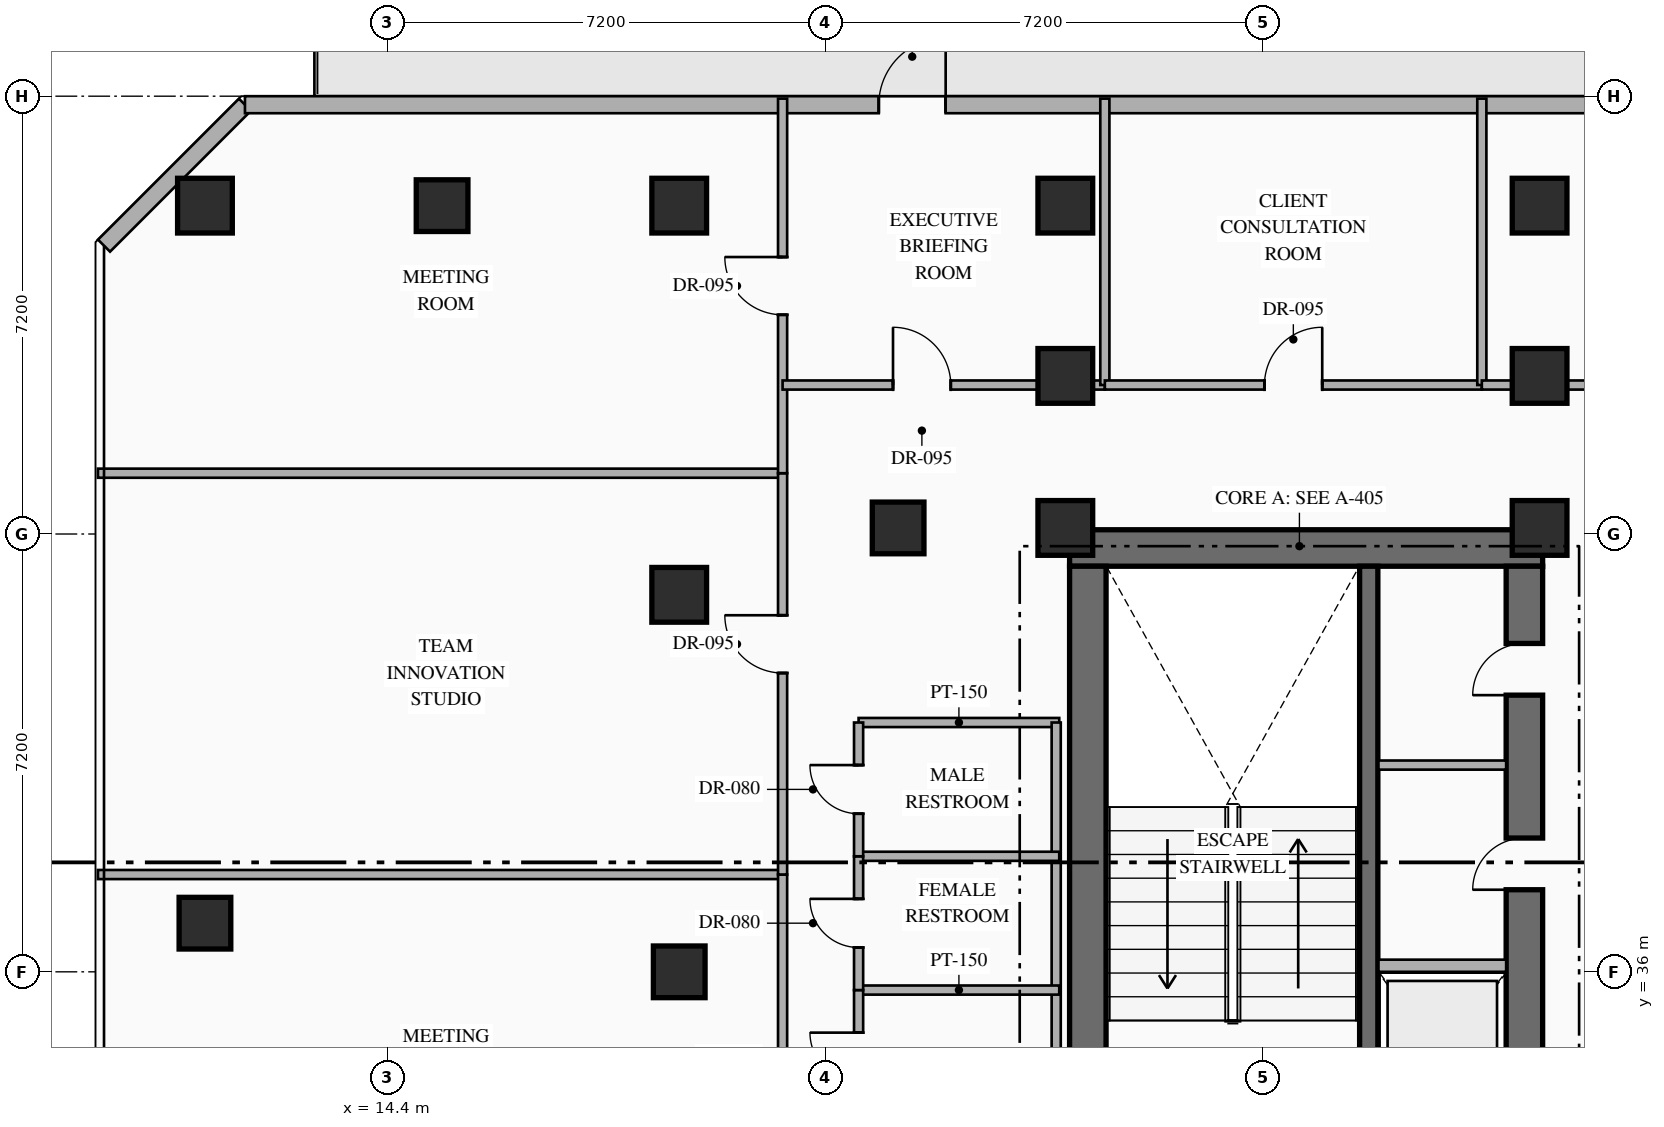
"""IFC4 building model, lengths in metres.
Left out: names, types, materials, properties, quantities, classifications, styles, units other than length and angle.
Written with IfcOpenShell. Run it as: python <this file> out.ifc"""

import sys

from ifc_helpers import new_model, si_unit, direction, frame, frame_2d, origin, origin_2d, place, context, subcontext, project, spatial, rectangle, hollow_rectangle, extrude, element, fill, save


model = new_model("IFC4")
c1 = context("Model", 3, precision=1e-05, world=origin(), true_north=direction((0.0, 1.0)))
c2 = subcontext(c1, "Body", "Model", "MODEL_VIEW")
j1 = project(units=[si_unit("LENGTHUNIT", "METRE"), si_unit("PLANEANGLEUNIT", "RADIAN")], contexts=[c1])
p1 = place(None, origin())
s1 = spatial("IfcSite", under=j1, at=p1, CompositionType="ELEMENT")
p2 = place(p1, origin())
s2 = spatial("IfcBuilding", under=s1, at=p2, CompositionType="ELEMENT")
p3 = place(p2, frame((0.0, 0.0, 112.05)))
s3 = spatial("IfcBuildingStorey", under=s2, at=p3, CompositionType="ELEMENT", Elevation=112.05)
p4 = place(p3, frame((25.62, 42.97, 0.0), z_axis=(0.0, 0.0, 1.0), x_axis=(1.0, 0.0, 0.0)))
e1 = element("IfcWall", 1, at=p4, inside=s3, PredefinedType="SHEAR", context=c2, shape_type="SweptSolid", body=[
    extrude(rectangle(XDim=7.78, YDim=0.6, at=frame_2d((3.89, 0.0))), origin(), (0.0, 0.0, 1.0), 3.6),
])
p5 = place(p3, frame((25.92, 33.19, 0.0), z_axis=(0.0, 0.0, 1.0), x_axis=(0.0, 1.0, 0.0)))
e2 = element("IfcWall", 2, at=p5, inside=s3, PredefinedType="SHEAR", context=c2, shape_type="SweptSolid", body=[
    extrude(rectangle(XDim=9.48, YDim=0.6, at=frame_2d((4.74, 0.0))), origin(), (0.0, 0.0, 1.0), 3.6),
])
p6 = place(p3, frame((33.1, 33.19, 0.0), z_axis=(0.0, 0.0, 1.0), x_axis=(0.0, 1.0, 0.0)))
e3 = element("IfcWall", 3, at=p6, inside=s3, PredefinedType="SHEAR", context=c2, shape_type="SweptSolid", body=[
    extrude(rectangle(XDim=9.48, YDim=0.6, at=frame_2d((4.74, 0.0))), origin(), (0.0, 0.0, 1.0), 3.6),
])
p7 = place(p6, frame((4.16, 0.0, 0.0)))
e4 = element("IfcOpeningElement", 4, at=p7, cuts=e3, PredefinedType="OPENING", context=c2, shape_type="SweptSolid", body=[
    extrude(rectangle(XDim=0.85, YDim=2.08, at=frame_2d((0.425, 1.04))), frame((0.0, 0.31, 0.0), z_axis=(0.0, -1.0, 0.0), x_axis=(1.0, 0.0, 0.0)), (0.0, 0.0, 1.0), 0.62),
])
p8 = place(p6, frame((7.36, 0.0, 0.0)))
e5 = element("IfcOpeningElement", 5, at=p8, cuts=e3, PredefinedType="OPENING", context=c2, shape_type="SweptSolid", body=[
    extrude(rectangle(XDim=0.85, YDim=2.08, at=frame_2d((0.425, 1.04))), frame((0.0, 0.31, 0.0), z_axis=(0.0, -1.0, 0.0), x_axis=(1.0, 0.0, 0.0)), (0.0, 0.0, 1.0), 0.62),
])
p9 = place(p3, frame((30.54, 33.19, 0.0), z_axis=(0.0, 0.0, 1.0), x_axis=(0.0, 1.0, 0.0)))
e6 = element("IfcWall", 6, at=p9, inside=s3, PredefinedType="SHEAR", context=c2, shape_type="SweptSolid", body=[
    extrude(rectangle(XDim=9.48, YDim=0.3, at=frame_2d((4.74, 0.0))), origin(), (0.0, 0.0, 1.0), 3.6),
])
for number, where, z_axis, x_axis in (
    (7, (25.55, 43.3, 0.0), (0.0, 0.0, 1.0), (1.0, 0.0, 0.0)),
    (8, (33.35, 43.3, 0.0), (0.0, 0.0, 1.0), (1.0, 0.0, 0.0)),
):
    element("IfcColumn", number, at=place(p3, frame(where, z_axis=z_axis, x_axis=x_axis)), inside=s3, PredefinedType="COLUMN", context=c2, shape_type="SweptSolid", body=[
        extrude(rectangle(XDim=0.9, YDim=0.9, at=origin_2d()), origin(), (0.0, 0.0, 1.0), 3.6),
    ])
for number, where, z_axis, x_axis in (
    (9, (25.55, 45.8, 0.0), (0.0, 0.0, 1.0), (1.0, 0.0, 0.0)),
    (10, (33.35, 45.8, 0.0), (0.0, 0.0, 1.0), (1.0, 0.0, 0.0)),
    (11, (11.4, 48.6, 0.0), (0.0, 0.0, 1.0), (1.0, 0.0, 0.0)),
    (12, (19.2, 48.6, 0.0), (0.0, 0.0, 1.0), (1.0, 0.0, 0.0)),
    (13, (25.55, 48.6, 0.0), (0.0, 0.0, 1.0), (1.0, 0.0, 0.0)),
    (14, (33.35, 48.6, 0.0), (0.0, 0.0, 1.0), (1.0, 0.0, 0.0)),
    (15, (19.2, 42.2, 0.0), (0.0, 0.0, 1.0), (1.0, 0.0, 0.0)),
):
    element("IfcColumn", number, at=place(p3, frame(where, z_axis=z_axis, x_axis=x_axis)), inside=s3, PredefinedType="COLUMN", context=c2, shape_type="SweptSolid", body=[
        extrude(hollow_rectangle(XDim=0.9, YDim=0.9, WallThickness=0.036, at=origin_2d()), origin(), (0.0, 0.0, 1.0), 3.6),
    ])
for number, where, z_axis, x_axis in (
    (16, (22.8, 43.3, 0.0), (0.0, 0.0, 1.0), (1.0, 0.0, 0.0)),
    (17, (11.4, 36.8, 0.0), (0.0, 0.0, 1.0), (1.0, 0.0, 0.0)),
    (18, (19.2, 36.0, 0.0), (0.0, 0.0, 1.0), (1.0, 0.0, 0.0)),
    (19, (15.3, 48.6, 0.0), (0.0, 0.0, 1.0), (1.0, 0.0, 0.0)),
):
    element("IfcColumn", number, at=place(p3, frame(where, z_axis=z_axis, x_axis=x_axis)), inside=s3, PredefinedType="COLUMN", context=c2, shape_type="SweptSolid", body=[
        extrude(hollow_rectangle(XDim=0.85, YDim=0.85, WallThickness=0.032, at=origin_2d()), origin(), (0.0, 0.0, 1.0), 3.6),
    ])
p10 = place(p3, frame((9.74, 47.942, 0.0), z_axis=(0.0, 0.0, 1.0), x_axis=(0.707106781187, 0.707106781187, 0.0)))
e20 = element("IfcWall", 20, at=p10, inside=s3, PredefinedType="STANDARD", context=c2, shape_type="SweptSolid", body=[
    extrude(rectangle(XDim=3.278, YDim=0.28, at=frame_2d((1.639, 0.0))), origin(), (0.0, 0.0, 1.0), 3.35),
])
p11 = place(p3, frame((12.058, 50.26, 0.0), z_axis=(0.0, 0.0, 1.0), x_axis=(1.0, 0.0, 0.0)))
e21 = element("IfcWall", 21, at=p11, inside=s3, PredefinedType="STANDARD", context=c2, shape_type="SweptSolid", body=[
    extrude(rectangle(XDim=30.484, YDim=0.28, at=frame_2d((15.242, 0.0))), origin(), (0.0, 0.0, 1.0), 3.35),
])
p12 = place(p11, frame((10.424, 0.0, 0.0)))
e22 = element("IfcOpeningElement", 22, at=p12, cuts=e21, PredefinedType="OPENING", context=c2, shape_type="SweptSolid", body=[
    extrude(rectangle(XDim=1.1, YDim=2.2, at=frame_2d((0.55, 1.1))), frame((0.0, 0.15, 0.0), z_axis=(0.0, -1.0, 0.0), x_axis=(1.0, 0.0, 0.0)), (0.0, 0.0, 1.0), 0.3),
])
p13 = place(p3, frame((30.7, 36.1, 0.0), z_axis=(0.0, 0.0, 1.0), x_axis=(1.0, 0.0, 0.0)))
e23 = element("IfcWall", 23, at=p13, inside=s3, PredefinedType="STANDARD", context=c2, shape_type="SweptSolid", body=[
    extrude(rectangle(XDim=2.1, YDim=0.2, at=frame_2d((1.05, 0.0))), origin(), (0.0, 0.0, 1.0), 3.35),
])
p14 = place(p3, frame((30.7, 39.4, 0.0), z_axis=(0.0, 0.0, 1.0), x_axis=(1.0, 0.0, 0.0)))
e24 = element("IfcWall", 24, at=p14, inside=s3, PredefinedType="PARTITIONING", context=c2, shape_type="SweptSolid", body=[
    extrude(rectangle(XDim=2.1, YDim=0.15, at=frame_2d((1.05, 0.0))), origin(), (0.0, 0.0, 1.0), 3.35),
])
p15 = place(p3, frame((22.15, 40.1, 0.0), z_axis=(0.0, 0.0, 1.0), x_axis=(1.0, 0.0, 0.0)))
e25 = element("IfcWall", 25, at=p15, inside=s3, PredefinedType="PARTITIONING", context=c2, shape_type="SweptSolid", body=[
    extrude(rectangle(XDim=3.3, YDim=0.15, at=frame_2d((1.65, 0.0))), origin(), (0.0, 0.0, 1.0), 3.35),
])
p16 = place(p3, frame((25.4, 33.5, 0.0), z_axis=(0.0, 0.0, 1.0), x_axis=(0.0, 1.0, 0.0)))
e26 = element("IfcWall", 26, at=p16, inside=s3, PredefinedType="PARTITIONING", context=c2, shape_type="SweptSolid", body=[
    extrude(rectangle(XDim=6.6, YDim=0.15, at=frame_2d((3.3, 0.0))), origin(), (0.0, 0.0, 1.0), 3.35),
])
for number, where, z_axis, x_axis in (
    (27, (22.15, 35.7, 0.0), (0.0, 0.0, 1.0), (1.0, 0.0, 0.0)),
    (28, (22.15, 37.9, 0.0), (0.0, 0.0, 1.0), (1.0, 0.0, 0.0)),
):
    element("IfcWall", number, at=place(p3, frame(where, z_axis=z_axis, x_axis=x_axis)), inside=s3, PredefinedType="PARTITIONING", context=c2, shape_type="SweptSolid", body=[
        extrude(rectangle(XDim=3.3, YDim=0.15, at=frame_2d((1.65, 0.0))), origin(), (0.0, 0.0, 1.0), 3.35),
    ])
p17 = place(p3, frame((22.15, 33.5, 0.0), z_axis=(0.0, 0.0, 1.0), x_axis=(0.0, 1.0, 0.0)))
e29 = element("IfcWall", 29, at=p17, inside=s3, PredefinedType="PARTITIONING", context=c2, shape_type="SweptSolid", body=[
    extrude(rectangle(XDim=2.2, YDim=0.15, at=frame_2d((1.1, 0.0))), origin(), (0.0, 0.0, 1.0), 3.35),
])
p18 = place(p17, frame((0.7, 0.0, 0.0)))
e30 = element("IfcOpeningElement", 30, at=p18, cuts=e29, PredefinedType="OPENING", context=c2, shape_type="SweptSolid", body=[
    extrude(rectangle(XDim=0.8, YDim=2.06, at=frame_2d((0.4, 1.03))), frame((0.0, 0.085, 0.0), z_axis=(0.0, -1.0, 0.0), x_axis=(1.0, 0.0, 0.0)), (0.0, 0.0, 1.0), 0.17),
])
p19 = place(p3, frame((22.15, 35.7, 0.0), z_axis=(0.0, 0.0, 1.0), x_axis=(0.0, 1.0, 0.0)))
e31 = element("IfcWall", 31, at=p19, inside=s3, PredefinedType="PARTITIONING", context=c2, shape_type="SweptSolid", body=[
    extrude(rectangle(XDim=2.2, YDim=0.15, at=frame_2d((1.1, 0.0))), origin(), (0.0, 0.0, 1.0), 3.35),
])
p20 = place(p19, frame((0.7, 0.0, 0.0)))
e32 = element("IfcOpeningElement", 32, at=p20, cuts=e31, PredefinedType="OPENING", context=c2, shape_type="SweptSolid", body=[
    extrude(rectangle(XDim=0.8, YDim=2.06, at=frame_2d((0.4, 1.03))), frame((0.0, 0.085, 0.0), z_axis=(0.0, -1.0, 0.0), x_axis=(1.0, 0.0, 0.0)), (0.0, 0.0, 1.0), 0.17),
])
p21 = place(p3, frame((22.15, 37.9, 0.0), z_axis=(0.0, 0.0, 1.0), x_axis=(0.0, 1.0, 0.0)))
e33 = element("IfcWall", 33, at=p21, inside=s3, PredefinedType="PARTITIONING", context=c2, shape_type="SweptSolid", body=[
    extrude(rectangle(XDim=2.2, YDim=0.15, at=frame_2d((1.1, 0.0))), origin(), (0.0, 0.0, 1.0), 3.35),
])
p22 = place(p21, frame((0.7, 0.0, 0.0)))
e34 = element("IfcOpeningElement", 34, at=p22, cuts=e33, PredefinedType="OPENING", context=c2, shape_type="SweptSolid", body=[
    extrude(rectangle(XDim=0.8, YDim=2.06, at=frame_2d((0.4, 1.03))), frame((0.0, 0.085, 0.0), z_axis=(0.0, -1.0, 0.0), x_axis=(1.0, 0.0, 0.0)), (0.0, 0.0, 1.0), 0.17),
])
p23 = place(p3, frame((9.64, 37.6, 0.0), z_axis=(0.0, 0.0, 1.0), x_axis=(1.0, 0.0, 0.0)))
e35 = element("IfcWall", 35, at=p23, inside=s3, PredefinedType="PARTITIONING", context=c2, shape_type="SweptSolid", body=[
    extrude(rectangle(XDim=11.26, YDim=0.15, at=frame_2d((5.63, 0.0))), origin(), (0.0, 0.0, 1.0), 3.35),
])
p24 = place(p3, frame((20.9, 31.8, 0.0), z_axis=(0.0, 0.0, 1.0), x_axis=(0.0, 1.0, 0.0)))
e36 = element("IfcWall", 36, at=p24, inside=s3, PredefinedType="PARTITIONING", context=c2, shape_type="SweptSolid", body=[
    extrude(rectangle(XDim=5.8, YDim=0.15, at=frame_2d((2.9, 0.0))), origin(), (0.0, 0.0, 1.0), 3.35),
])
p25 = place(p24, frame((0.38, 0.0, 0.0)))
e37 = element("IfcOpeningElement", 37, at=p25, cuts=e36, PredefinedType="OPENING", context=c2, shape_type="SweptSolid", body=[
    extrude(rectangle(XDim=0.95, YDim=2.15, at=frame_2d((0.475, 1.075))), frame((0.0, 0.085, 0.0), z_axis=(0.0, -1.0, 0.0), x_axis=(1.0, 0.0, 0.0)), (0.0, 0.0, 1.0), 0.17),
])
p26 = place(p3, frame((9.64, 44.2, 0.0), z_axis=(0.0, 0.0, 1.0), x_axis=(1.0, 0.0, 0.0)))
e38 = element("IfcWall", 38, at=p26, inside=s3, PredefinedType="PARTITIONING", context=c2, shape_type="SweptSolid", body=[
    extrude(rectangle(XDim=11.26, YDim=0.15, at=frame_2d((5.63, 0.0))), origin(), (0.0, 0.0, 1.0), 3.35),
])
p27 = place(p3, frame((20.9, 37.6, 0.0), z_axis=(0.0, 0.0, 1.0), x_axis=(0.0, 1.0, 0.0)))
e39 = element("IfcWall", 39, at=p27, inside=s3, PredefinedType="PARTITIONING", context=c2, shape_type="SweptSolid", body=[
    extrude(rectangle(XDim=6.6, YDim=0.15, at=frame_2d((3.3, 0.0))), origin(), (0.0, 0.0, 1.0), 3.35),
])
p28 = place(p27, frame((3.314, 0.0, 0.0)))
e40 = element("IfcOpeningElement", 40, at=p28, cuts=e39, PredefinedType="OPENING", context=c2, shape_type="SweptSolid", body=[
    extrude(rectangle(XDim=0.95, YDim=2.15, at=frame_2d((0.475, 1.075))), frame((0.0, 0.085, 0.0), z_axis=(0.0, -1.0, 0.0), x_axis=(1.0, 0.0, 0.0)), (0.0, 0.0, 1.0), 0.17),
])
p29 = place(p3, frame((20.9, 44.2, 0.0), z_axis=(0.0, 0.0, 1.0), x_axis=(0.0, 1.0, 0.0)))
e41 = element("IfcWall", 41, at=p29, inside=s3, PredefinedType="PARTITIONING", context=c2, shape_type="SweptSolid", body=[
    extrude(rectangle(XDim=6.16, YDim=0.15, at=frame_2d((3.08, 0.0))), origin(), (0.0, 0.0, 1.0), 3.35),
])
p30 = place(p29, frame((2.605, 0.0, 0.0)))
e42 = element("IfcOpeningElement", 42, at=p30, cuts=e41, PredefinedType="OPENING", context=c2, shape_type="SweptSolid", body=[
    extrude(rectangle(XDim=0.95, YDim=2.15, at=frame_2d((0.475, 1.075))), frame((0.0, 0.085, 0.0), z_axis=(0.0, -1.0, 0.0), x_axis=(1.0, 0.0, 0.0)), (0.0, 0.0, 1.0), 0.17),
])
p31 = place(p3, frame((20.9, 45.65, 0.0), z_axis=(0.0, 0.0, 1.0), x_axis=(1.0, 0.0, 0.0)))
e43 = element("IfcWall", 43, at=p31, inside=s3, PredefinedType="PARTITIONING", context=c2, shape_type="SweptSolid", body=[
    extrude(rectangle(XDim=5.3, YDim=0.15, at=frame_2d((2.65, 0.0))), origin(), (0.0, 0.0, 1.0), 2.695),
])
p32 = place(p31, frame((1.816, 0.0, 0.0)))
e44 = element("IfcOpeningElement", 44, at=p32, cuts=e43, PredefinedType="OPENING", context=c2, shape_type="SweptSolid", body=[
    extrude(rectangle(XDim=0.95, YDim=2.15, at=frame_2d((0.475, 1.075))), frame((0.0, 0.085, 0.0), z_axis=(0.0, -1.0, 0.0), x_axis=(1.0, 0.0, 0.0)), (0.0, 0.0, 1.0), 0.17),
])
p33 = place(p3, frame((26.2, 45.65, 0.0), z_axis=(0.0, 0.0, 1.0), x_axis=(0.0, 1.0, 0.0)))
e45 = element("IfcWall", 45, at=p33, inside=s3, PredefinedType="PARTITIONING", context=c2, shape_type="SweptSolid", body=[
    extrude(rectangle(XDim=4.71, YDim=0.15, at=frame_2d((2.355, 0.0))), origin(), (0.0, 0.0, 1.0), 3.35),
])
p34 = place(p3, frame((26.2, 45.65, 0.0), z_axis=(0.0, 0.0, 1.0), x_axis=(1.0, 0.0, 0.0)))
e46 = element("IfcWall", 46, at=p34, inside=s3, PredefinedType="PARTITIONING", context=c2, shape_type="SweptSolid", body=[
    extrude(rectangle(XDim=6.2, YDim=0.15, at=frame_2d((3.1, 0.0))), origin(), (0.0, 0.0, 1.0), 2.695),
])
p35 = place(p34, frame((2.625, 0.0, 0.0)))
e47 = element("IfcOpeningElement", 47, at=p35, cuts=e46, PredefinedType="OPENING", context=c2, shape_type="SweptSolid", body=[
    extrude(rectangle(XDim=0.95, YDim=2.15, at=frame_2d((0.475, 1.075))), frame((0.0, 0.085, 0.0), z_axis=(0.0, -1.0, 0.0), x_axis=(1.0, 0.0, 0.0)), (0.0, 0.0, 1.0), 0.17),
])
p36 = place(p3, frame((32.4, 45.65, 0.0), z_axis=(0.0, 0.0, 1.0), x_axis=(0.0, 1.0, 0.0)))
e48 = element("IfcWall", 48, at=p36, inside=s3, PredefinedType="PARTITIONING", context=c2, shape_type="SweptSolid", body=[
    extrude(rectangle(XDim=4.71, YDim=0.15, at=frame_2d((2.355, 0.0))), origin(), (0.0, 0.0, 1.0), 3.35),
])
p37 = place(p3, frame((32.4, 45.65, 0.0), z_axis=(0.0, 0.0, 1.0), x_axis=(1.0, 0.0, 0.0)))
e49 = element("IfcWall", 49, at=p37, inside=s3, PredefinedType="PARTITIONING", context=c2, shape_type="SweptSolid", body=[
    extrude(rectangle(XDim=6.6, YDim=0.15, at=frame_2d((3.3, 0.0))), origin(), (0.0, 0.0, 1.0), 2.695),
])
p38 = place(p37, frame((2.825, 0.0, 0.0)))
e50 = element("IfcOpeningElement", 50, at=p38, cuts=e49, PredefinedType="OPENING", context=c2, shape_type="SweptSolid", body=[
    extrude(rectangle(XDim=0.95, YDim=2.15, at=frame_2d((0.475, 1.075))), frame((0.0, 0.085, 0.0), z_axis=(0.0, -1.0, 0.0), x_axis=(1.0, 0.0, 0.0)), (0.0, 0.0, 1.0), 0.17),
])
p39 = place(p12, origin())
e51 = element("IfcDoor", 51, at=p39, inside=s3, OperationType="SINGLE_SWING_RIGHT", PredefinedType="DOOR", context=c2, shape_type="SweptSolid", body=[
    extrude(rectangle(XDim=1.1, YDim=2.2, at=frame_2d((0.55, 1.1))), frame((0.0, 0.025, 0.0), z_axis=(0.0, -1.0, 0.0), x_axis=(1.0, 0.0, 0.0)), (0.0, 0.0, 1.0), 0.05),
])
fill(e22, e51)
p40 = place(p7, origin())
e52 = element("IfcDoor", 52, at=p40, inside=s3, OperationType="SINGLE_SWING_LEFT", PredefinedType="DOOR", context=c2, shape_type="SweptSolid", body=[
    extrude(rectangle(XDim=0.85, YDim=2.08, at=frame_2d((0.425, 1.04))), frame((0.0, 0.025, 0.0), z_axis=(0.0, -1.0, 0.0), x_axis=(1.0, 0.0, 0.0)), (0.0, 0.0, 1.0), 0.05),
])
fill(e4, e52)
p41 = place(p8, origin())
e53 = element("IfcDoor", 53, at=p41, inside=s3, OperationType="SINGLE_SWING_LEFT", PredefinedType="DOOR", context=c2, shape_type="SweptSolid", body=[
    extrude(rectangle(XDim=0.85, YDim=2.08, at=frame_2d((0.425, 1.04))), frame((0.0, 0.025, 0.0), z_axis=(0.0, -1.0, 0.0), x_axis=(1.0, 0.0, 0.0)), (0.0, 0.0, 1.0), 0.05),
])
fill(e5, e53)
p42 = place(p18, origin())
e54 = element("IfcDoor", 54, at=p42, inside=s3, OperationType="SINGLE_SWING_RIGHT", PredefinedType="DOOR", context=c2, shape_type="SweptSolid", body=[
    extrude(rectangle(XDim=0.8, YDim=2.06, at=frame_2d((0.4, 1.03))), frame((0.0, 0.025, 0.0), z_axis=(0.0, -1.0, 0.0), x_axis=(1.0, 0.0, 0.0)), (0.0, 0.0, 1.0), 0.05),
])
fill(e30, e54)
p43 = place(p20, origin())
e55 = element("IfcDoor", 55, at=p43, inside=s3, OperationType="SINGLE_SWING_RIGHT", PredefinedType="DOOR", context=c2, shape_type="SweptSolid", body=[
    extrude(rectangle(XDim=0.8, YDim=2.06, at=frame_2d((0.4, 1.03))), frame((0.0, 0.025, 0.0), z_axis=(0.0, -1.0, 0.0), x_axis=(1.0, 0.0, 0.0)), (0.0, 0.0, 1.0), 0.05),
])
fill(e32, e55)
p44 = place(p22, origin())
e56 = element("IfcDoor", 56, at=p44, inside=s3, OperationType="SINGLE_SWING_RIGHT", PredefinedType="DOOR", context=c2, shape_type="SweptSolid", body=[
    extrude(rectangle(XDim=0.8, YDim=2.06, at=frame_2d((0.4, 1.03))), frame((0.0, 0.025, 0.0), z_axis=(0.0, -1.0, 0.0), x_axis=(1.0, 0.0, 0.0)), (0.0, 0.0, 1.0), 0.05),
])
fill(e34, e56)
p45 = place(p28, origin())
e57 = element("IfcDoor", 57, at=p45, inside=s3, OperationType="SINGLE_SWING_RIGHT", PredefinedType="DOOR", context=c2, shape_type="SweptSolid", body=[
    extrude(rectangle(XDim=0.95, YDim=2.15, at=frame_2d((0.475, 1.075))), frame((0.0, 0.025, 0.0), z_axis=(0.0, -1.0, 0.0), x_axis=(1.0, 0.0, 0.0)), (0.0, 0.0, 1.0), 0.05),
])
fill(e40, e57)
p46 = place(p30, origin())
e58 = element("IfcDoor", 58, at=p46, inside=s3, OperationType="SINGLE_SWING_RIGHT", PredefinedType="DOOR", context=c2, shape_type="SweptSolid", body=[
    extrude(rectangle(XDim=0.95, YDim=2.15, at=frame_2d((0.475, 1.075))), frame((0.0, 0.025, 0.0), z_axis=(0.0, -1.0, 0.0), x_axis=(1.0, 0.0, 0.0)), (0.0, 0.0, 1.0), 0.05),
])
fill(e42, e58)
p47 = place(p32, origin())
e59 = element("IfcDoor", 59, at=p47, inside=s3, OperationType="SINGLE_SWING_LEFT", PredefinedType="DOOR", context=c2, shape_type="SweptSolid", body=[
    extrude(rectangle(XDim=0.95, YDim=2.15, at=frame_2d((0.475, 1.075))), frame((0.0, 0.025, 0.0), z_axis=(0.0, -1.0, 0.0), x_axis=(1.0, 0.0, 0.0)), (0.0, 0.0, 1.0), 0.05),
])
fill(e44, e59)
p48 = place(p35, origin())
e60 = element("IfcDoor", 60, at=p48, inside=s3, OperationType="SINGLE_SWING_RIGHT", PredefinedType="DOOR", context=c2, shape_type="SweptSolid", body=[
    extrude(rectangle(XDim=0.95, YDim=2.15, at=frame_2d((0.475, 1.075))), frame((0.0, 0.025, 0.0), z_axis=(0.0, -1.0, 0.0), x_axis=(1.0, 0.0, 0.0)), (0.0, 0.0, 1.0), 0.05),
])
fill(e47, e60)
save(model, sys.argv[1])
